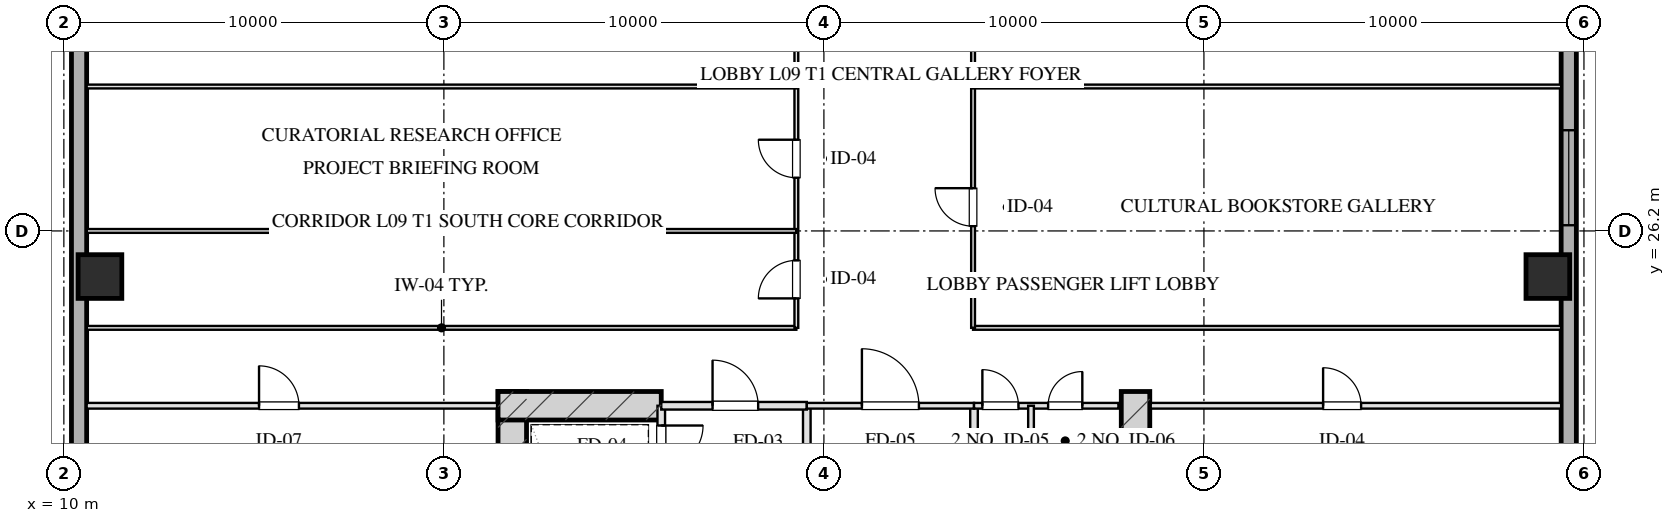
"""IFC4 building model, lengths in metres.
Left out: names, types, materials, properties, quantities, classifications, styles, units other than length and angle.
Written with IfcOpenShell. Run it as: python <this file> out.ifc"""

import sys

from ifc_helpers import new_model, si_unit, direction, frame, frame_2d, origin, origin_2d, place, context, subcontext, project, spatial, rectangle, hollow_rectangle, extrude, element, fill, save


model = new_model("IFC4")
c1 = context("Model", 3, precision=1e-05, world=origin(), true_north=direction((0.0, 1.0)))
c2 = subcontext(c1, "Body", "Model", "MODEL_VIEW")
j1 = project(units=[si_unit("LENGTHUNIT", "METRE"), si_unit("PLANEANGLEUNIT", "RADIAN")], contexts=[c1])
p1 = place(None, origin())
s1 = spatial("IfcSite", under=j1, at=p1, CompositionType="ELEMENT")
p2 = place(p1, origin())
s2 = spatial("IfcBuilding", under=s1, at=p2, CompositionType="ELEMENT")
p3 = place(p2, frame((0.0, 0.0, 42.0)))
s3 = spatial("IfcBuildingStorey", under=s2, at=p3, CompositionType="ELEMENT", Elevation=42.0)
for number, where, z_axis, x_axis in (
    (1, (21.8, 21.975, 0.0), (0.0, 0.0, 1.0), (0.0, -1.0, 0.0)),
    (2, (38.2, 21.975, 0.0), (0.0, 0.0, 1.0), (0.0, -1.0, 0.0)),
):
    element("IfcWall", number, at=place(p3, frame(where, z_axis=z_axis, x_axis=x_axis)), inside=s3, PredefinedType="SHEAR", context=c2, shape_type="SweptSolid", body=[
        extrude(rectangle(XDim=9.63, YDim=0.75, at=frame_2d((4.815, 0.0))), origin(), (0.0, 0.0, 1.0), 4.0),
    ])
p4 = place(p3, frame((21.425, 21.6, 0.0), z_axis=(0.0, 0.0, 1.0), x_axis=(1.0, 0.0, 0.0)))
e3 = element("IfcWall", 3, at=p4, inside=s3, PredefinedType="SHEAR", context=c2, shape_type="SweptSolid", body=[
    extrude(rectangle(XDim=4.295, YDim=0.75, at=frame_2d((2.147, 0.0))), origin(), (0.0, 0.0, 1.0), 4.0),
])
for number, where, z_axis, x_axis in (
    (4, (10.95, 25.0, 0.0), (0.0, 0.0, 1.0), (1.0, 0.0, 0.0)),
    (5, (49.05, 25.0, 0.0), (0.0, 0.0, 1.0), (1.0, 0.0, 0.0)),
):
    element("IfcColumn", number, at=place(p3, frame(where, z_axis=z_axis, x_axis=x_axis)), inside=s3, PredefinedType="COLUMN", context=c2, shape_type="SweptSolid", body=[
        extrude(hollow_rectangle(XDim=1.15, YDim=1.15, WallThickness=0.04, at=origin_2d()), origin(), (0.0, 0.0, 1.0), 4.001),
    ])
p5 = place(p3, frame((10.4, 7.2, 0.0), z_axis=(0.0, 0.0, 1.0), x_axis=(0.0, 1.0, 0.0)))
e6 = element("IfcWall", 6, at=p5, inside=s3, PredefinedType="SOLIDWALL", context=c2, shape_type="SweptSolid", body=[
    extrude(rectangle(XDim=53.6, YDim=0.4, at=frame_2d((26.8, 0.0))), origin(), (0.0, 0.0, 1.0), 3.1),
])
p6 = place(p5, frame((28.15, 0.0, 0.75)))
e7 = element("IfcOpeningElement", 7, at=p6, cuts=e6, PredefinedType="OPENING", context=c2, shape_type="SweptSolid", body=[
    extrude(rectangle(XDim=2.5, YDim=1.75, at=frame_2d((1.25, 0.875))), frame((0.0, 0.21, 0.0), z_axis=(0.0, -1.0, 0.0), x_axis=(1.0, 0.0, 0.0)), (0.0, 0.0, 1.0), 0.42),
])
p7 = place(p3, frame((49.6, 60.8, 0.0), z_axis=(0.0, 0.0, 1.0), x_axis=(0.0, -1.0, 0.0)))
e8 = element("IfcWall", 8, at=p7, inside=s3, PredefinedType="SOLIDWALL", context=c2, shape_type="SweptSolid", body=[
    extrude(rectangle(XDim=53.6, YDim=0.4, at=frame_2d((26.8, 0.0))), origin(), (0.0, 0.0, 1.0), 3.1),
])
p8 = place(p7, frame((31.95, 0.0, 0.75)))
e9 = element("IfcOpeningElement", 9, at=p8, cuts=e8, PredefinedType="OPENING", context=c2, shape_type="SweptSolid", body=[
    extrude(rectangle(XDim=2.5, YDim=1.75, at=frame_2d((1.25, 0.875))), frame((0.0, 0.21, 0.0), z_axis=(0.0, -1.0, 0.0), x_axis=(1.0, 0.0, 0.0)), (0.0, 0.0, 1.0), 0.42),
])
p9 = place(p7, frame((19.15, 0.0, 0.75)))
e10 = element("IfcOpeningElement", 10, at=p9, cuts=e8, PredefinedType="OPENING", context=c2, shape_type="SweptSolid", body=[
    extrude(rectangle(XDim=2.5, YDim=1.75, at=frame_2d((1.25, 0.875))), frame((0.0, 0.21, 0.0), z_axis=(0.0, -1.0, 0.0), x_axis=(1.0, 0.0, 0.0)), (0.0, 0.0, 1.0), 0.42),
])
p10 = place(p3, frame((25.72, 21.6, 0.0), z_axis=(0.0, 0.0, 1.0), x_axis=(0.0, -1.0, 0.0)))
e11 = element("IfcWall", 11, at=p10, inside=s3, PredefinedType="PARTITIONING", context=c2, shape_type="SweptSolid", body=[
    extrude(rectangle(XDim=1.9, YDim=0.2, at=frame_2d((0.95, 0.0))), origin(), (0.0, 0.0, 1.0), 3.705),
])
p11 = place(p10, frame((0.52, 0.0, 0.0)))
e12 = element("IfcOpeningElement", 12, at=p11, cuts=e11, PredefinedType="OPENING", context=c2, shape_type="SweptSolid", body=[
    extrude(rectangle(XDim=1.1, YDim=2.05, at=frame_2d((0.55, 1.025))), frame((0.0, 0.11, 0.0), z_axis=(0.0, -1.0, 0.0), x_axis=(1.0, 0.0, 0.0)), (0.0, 0.0, 1.0), 0.22),
])
p12 = place(p3, frame((29.55, 21.6, 0.0), z_axis=(0.0, 0.0, 1.0), x_axis=(0.0, -1.0, 0.0)))
e13 = element("IfcWall", 13, at=p12, inside=s3, PredefinedType="PARTITIONING", context=c2, shape_type="SweptSolid", body=[
    extrude(rectangle(XDim=8.43, YDim=0.2, at=frame_2d((4.215, 0.0))), origin(), (0.0, 0.0, 1.0), 3.705),
])
p13 = place(p3, frame((25.72, 21.6, 0.0), z_axis=(0.0, 0.0, 1.0), x_axis=(1.0, 0.0, 0.0)))
e14 = element("IfcWall", 14, at=p13, inside=s3, PredefinedType="PARTITIONING", context=c2, shape_type="SweptSolid", body=[
    extrude(rectangle(XDim=3.83, YDim=0.2, at=frame_2d((1.915, 0.0))), origin(), (0.0, 0.0, 1.0), 3.705),
])
p14 = place(p13, frame((1.35, 0.0, 0.0)))
e15 = element("IfcOpeningElement", 15, at=p14, cuts=e14, PredefinedType="OPENING", context=c2, shape_type="SweptSolid", body=[
    extrude(rectangle(XDim=1.2, YDim=2.05, at=frame_2d((0.6, 1.025))), frame((0.0, 0.11, 0.0), z_axis=(0.0, -1.0, 0.0), x_axis=(1.0, 0.0, 0.0)), (0.0, 0.0, 1.0), 0.22),
])
p15 = place(p3, frame((33.95, 21.6, 0.0), z_axis=(0.0, 0.0, 1.0), x_axis=(0.0, -1.0, 0.0)))
e16 = element("IfcWall", 16, at=p15, inside=s3, PredefinedType="PARTITIONING", context=c2, shape_type="SweptSolid", body=[
    extrude(rectangle(XDim=8.43, YDim=0.2, at=frame_2d((4.215, 0.0))), origin(), (0.0, 0.0, 1.0), 3.705),
])
p16 = place(p3, frame((29.55, 21.6, 0.0), z_axis=(0.0, 0.0, 1.0), x_axis=(1.0, 0.0, 0.0)))
e17 = element("IfcWall", 17, at=p16, inside=s3, PredefinedType="PARTITIONING", context=c2, shape_type="SweptSolid", body=[
    extrude(rectangle(XDim=4.4, YDim=0.15, at=frame_2d((2.2, 0.0))), origin(), (0.0, 0.0, 1.0), 3.705),
])
p17 = place(p16, frame((1.45, 0.0, 0.0)))
e18 = element("IfcOpeningElement", 18, at=p17, cuts=e17, PredefinedType="OPENING", context=c2, shape_type="SweptSolid", body=[
    extrude(rectangle(XDim=1.5, YDim=2.05, at=frame_2d((0.75, 1.025))), frame((0.0, 0.085, 0.0), z_axis=(0.0, -1.0, 0.0), x_axis=(1.0, 0.0, 0.0)), (0.0, 0.0, 1.0), 0.17),
])
p18 = place(p3, frame((33.95, 21.6, 0.0), z_axis=(0.0, 0.0, 1.0), x_axis=(1.0, 0.0, 0.0)))
e19 = element("IfcWall", 19, at=p18, inside=s3, PredefinedType="PARTITIONING", context=c2, shape_type="SweptSolid", body=[
    extrude(rectangle(XDim=3.8, YDim=0.15, at=frame_2d((1.9, 0.0))), origin(), (0.0, 0.0, 1.0), 3.705),
])
p19 = place(p18, frame((0.22, 0.0, 0.0)))
e20 = element("IfcOpeningElement", 20, at=p19, cuts=e19, PredefinedType="OPENING", context=c2, shape_type="SweptSolid", body=[
    extrude(rectangle(XDim=0.95, YDim=2.05, at=frame_2d((0.475, 1.025))), frame((0.0, 0.085, 0.0), z_axis=(0.0, -1.0, 0.0), x_axis=(1.0, 0.0, 0.0)), (0.0, 0.0, 1.0), 0.17),
])
p20 = place(p18, frame((1.95, 0.0, 0.0)))
e21 = element("IfcOpeningElement", 21, at=p20, cuts=e19, PredefinedType="OPENING", context=c2, shape_type="SweptSolid", body=[
    extrude(rectangle(XDim=0.9, YDim=2.05, at=frame_2d((0.45, 1.025))), frame((0.0, 0.085, 0.0), z_axis=(0.0, -1.0, 0.0), x_axis=(1.0, 0.0, 0.0)), (0.0, 0.0, 1.0), 0.17),
])
p21 = place(p3, frame((35.45, 21.6, 0.0), z_axis=(0.0, 0.0, 1.0), x_axis=(0.0, -1.0, 0.0)))
e22 = element("IfcWall", 22, at=p21, inside=s3, PredefinedType="PARTITIONING", context=c2, shape_type="SweptSolid", body=[
    extrude(rectangle(XDim=8.43, YDim=0.15, at=frame_2d((4.215, 0.0))), origin(), (0.0, 0.0, 1.0), 3.345),
])
p22 = place(p21, frame((2.55, 0.0, 0.0)))
e23 = element("IfcOpeningElement", 23, at=p22, cuts=e22, PredefinedType="OPENING", context=c2, shape_type="SweptSolid", body=[
    extrude(rectangle(XDim=0.95, YDim=2.05, at=frame_2d((0.475, 1.025))), frame((0.0, 0.085, 0.0), z_axis=(0.0, -1.0, 0.0), x_axis=(1.0, 0.0, 0.0)), (0.0, 0.0, 1.0), 0.17),
])
p23 = place(p21, frame((5.6, 0.0, 0.0)))
e24 = element("IfcOpeningElement", 24, at=p23, cuts=e22, PredefinedType="OPENING", context=c2, shape_type="SweptSolid", body=[
    extrude(rectangle(XDim=0.9, YDim=2.05, at=frame_2d((0.45, 1.025))), frame((0.0, 0.085, 0.0), z_axis=(0.0, -1.0, 0.0), x_axis=(1.0, 0.0, 0.0)), (0.0, 0.0, 1.0), 0.17),
])
p24 = place(p3, frame((10.6, 21.6, 0.0), z_axis=(0.0, 0.0, 1.0), x_axis=(1.0, 0.0, 0.0)))
e25 = element("IfcWall", 25, at=p24, inside=s3, PredefinedType="PARTITIONING", context=c2, shape_type="SweptSolid", body=[
    extrude(rectangle(XDim=10.8, YDim=0.15, at=frame_2d((5.4, 0.0))), origin(), (0.0, 0.0, 1.0), 3.705),
])
p25 = place(p24, frame((4.536, 0.0, 0.0)))
e26 = element("IfcOpeningElement", 26, at=p25, cuts=e25, PredefinedType="OPENING", context=c2, shape_type="SweptSolid", body=[
    extrude(rectangle(XDim=1.05, YDim=2.05, at=frame_2d((0.525, 1.025))), frame((0.0, 0.085, 0.0), z_axis=(0.0, -1.0, 0.0), x_axis=(1.0, 0.0, 0.0)), (0.0, 0.0, 1.0), 0.17),
])
p26 = place(p3, frame((38.6, 21.6, 0.0), z_axis=(0.0, 0.0, 1.0), x_axis=(1.0, 0.0, 0.0)))
e27 = element("IfcWall", 27, at=p26, inside=s3, PredefinedType="PARTITIONING", context=c2, shape_type="SweptSolid", body=[
    extrude(rectangle(XDim=10.8, YDim=0.15, at=frame_2d((5.4, 0.0))), origin(), (0.0, 0.0, 1.0), 3.705),
])
p27 = place(p26, frame((4.536, 0.0, 0.0)))
e28 = element("IfcOpeningElement", 28, at=p27, cuts=e27, PredefinedType="OPENING", context=c2, shape_type="SweptSolid", body=[
    extrude(rectangle(XDim=1.0, YDim=2.05, at=frame_2d((0.5, 1.025))), frame((0.0, 0.085, 0.0), z_axis=(0.0, -1.0, 0.0), x_axis=(1.0, 0.0, 0.0)), (0.0, 0.0, 1.0), 0.17),
])
p28 = place(p3, frame((10.6, 23.65, 0.0), z_axis=(0.0, 0.0, 1.0), x_axis=(1.0, 0.0, 0.0)))
e29 = element("IfcWall", 29, at=p28, inside=s3, PredefinedType="MOVABLE", context=c2, shape_type="SweptSolid", body=[
    extrude(rectangle(XDim=18.675, YDim=0.1, at=frame_2d((9.337, 0.0))), origin(), (0.0, 0.0, 1.0), 3.705),
])
p29 = place(p3, frame((33.925, 23.65, 0.0), z_axis=(0.0, 0.0, 1.0), x_axis=(1.0, 0.0, 0.0)))
e30 = element("IfcWall", 30, at=p29, inside=s3, PredefinedType="MOVABLE", context=c2, shape_type="SweptSolid", body=[
    extrude(rectangle(XDim=15.475, YDim=0.1, at=frame_2d((7.737, 0.0))), origin(), (0.0, 0.0, 1.0), 3.705),
])
p30 = place(p3, frame((29.275, 23.65, 0.0), z_axis=(0.0, 0.0, 1.0), x_axis=(0.0, 1.0, 0.0)))
e31 = element("IfcWall", 31, at=p30, inside=s3, PredefinedType="MOVABLE", context=c2, shape_type="SweptSolid", body=[
    extrude(rectangle(XDim=20.7, YDim=0.1, at=frame_2d((10.35, 0.0))), origin(), (0.0, 0.0, 1.0), 3.705),
])
p31 = place(p30, frame((0.775, 0.0, 0.0)))
e32 = element("IfcOpeningElement", 32, at=p31, cuts=e31, PredefinedType="OPENING", context=c2, shape_type="SweptSolid", body=[
    extrude(rectangle(XDim=1.0, YDim=2.05, at=frame_2d((0.5, 1.025))), frame((0.0, 0.06, 0.0), z_axis=(0.0, -1.0, 0.0), x_axis=(1.0, 0.0, 0.0)), (0.0, 0.0, 1.0), 0.12),
])
p32 = place(p30, frame((3.95, 0.0, 0.0)))
e33 = element("IfcOpeningElement", 33, at=p32, cuts=e31, PredefinedType="OPENING", context=c2, shape_type="SweptSolid", body=[
    extrude(rectangle(XDim=1.0, YDim=2.05, at=frame_2d((0.5, 1.025))), frame((0.0, 0.06, 0.0), z_axis=(0.0, -1.0, 0.0), x_axis=(1.0, 0.0, 0.0)), (0.0, 0.0, 1.0), 0.12),
])
p33 = place(p30, frame((8.364, 0.0, 0.0)))
e34 = element("IfcOpeningElement", 34, at=p33, cuts=e31, PredefinedType="OPENING", context=c2, shape_type="SweptSolid", body=[
    extrude(rectangle(XDim=1.0, YDim=2.05, at=frame_2d((0.5, 1.025))), frame((0.0, 0.06, 0.0), z_axis=(0.0, -1.0, 0.0), x_axis=(1.0, 0.0, 0.0)), (0.0, 0.0, 1.0), 0.12),
])
p34 = place(p30, frame((12.864, 0.0, 0.0)))
e35 = element("IfcOpeningElement", 35, at=p34, cuts=e31, PredefinedType="OPENING", context=c2, shape_type="SweptSolid", body=[
    extrude(rectangle(XDim=1.05, YDim=2.05, at=frame_2d((0.525, 1.025))), frame((0.0, 0.06, 0.0), z_axis=(0.0, -1.0, 0.0), x_axis=(1.0, 0.0, 0.0)), (0.0, 0.0, 1.0), 0.12),
])
p35 = place(p30, frame((16.383, 0.0, 0.0)))
e36 = element("IfcOpeningElement", 36, at=p35, cuts=e31, PredefinedType="OPENING", context=c2, shape_type="SweptSolid", body=[
    extrude(rectangle(XDim=0.85, YDim=2.05, at=frame_2d((0.425, 1.025))), frame((0.0, 0.06, 0.0), z_axis=(0.0, -1.0, 0.0), x_axis=(1.0, 0.0, 0.0)), (0.0, 0.0, 1.0), 0.12),
])
p36 = place(p30, frame((19.058, 0.0, 0.0)))
e37 = element("IfcOpeningElement", 37, at=p36, cuts=e31, PredefinedType="OPENING", context=c2, shape_type="SweptSolid", body=[
    extrude(rectangle(XDim=1.0, YDim=2.05, at=frame_2d((0.5, 1.025))), frame((0.0, 0.06, 0.0), z_axis=(0.0, -1.0, 0.0), x_axis=(1.0, 0.0, 0.0)), (0.0, 0.0, 1.0), 0.12),
])
p37 = place(p3, frame((33.925, 23.65, 0.0), z_axis=(0.0, 0.0, 1.0), x_axis=(0.0, 1.0, 0.0)))
e38 = element("IfcWall", 38, at=p37, inside=s3, PredefinedType="MOVABLE", context=c2, shape_type="SweptSolid", body=[
    extrude(rectangle(XDim=20.7, YDim=0.1, at=frame_2d((10.35, 0.0))), origin(), (0.0, 0.0, 1.0), 3.705),
])
p38 = place(p37, frame((2.675, 0.0, 0.0)))
e39 = element("IfcOpeningElement", 39, at=p38, cuts=e38, PredefinedType="OPENING", context=c2, shape_type="SweptSolid", body=[
    extrude(rectangle(XDim=1.0, YDim=2.05, at=frame_2d((0.5, 1.025))), frame((0.0, 0.06, 0.0), z_axis=(0.0, -1.0, 0.0), x_axis=(1.0, 0.0, 0.0)), (0.0, 0.0, 1.0), 0.12),
])
p39 = place(p37, frame((9.85, 0.0, 0.0)))
e40 = element("IfcOpeningElement", 40, at=p39, cuts=e38, PredefinedType="OPENING", context=c2, shape_type="SweptSolid", body=[
    extrude(rectangle(XDim=1.0, YDim=2.05, at=frame_2d((0.5, 1.025))), frame((0.0, 0.06, 0.0), z_axis=(0.0, -1.0, 0.0), x_axis=(1.0, 0.0, 0.0)), (0.0, 0.0, 1.0), 0.12),
])
p40 = place(p37, frame((17.025, 0.0, 0.0)))
e41 = element("IfcOpeningElement", 41, at=p40, cuts=e38, PredefinedType="OPENING", context=c2, shape_type="SweptSolid", body=[
    extrude(rectangle(XDim=1.0, YDim=2.05, at=frame_2d((0.5, 1.025))), frame((0.0, 0.06, 0.0), z_axis=(0.0, -1.0, 0.0), x_axis=(1.0, 0.0, 0.0)), (0.0, 0.0, 1.0), 0.12),
])
for number, where, z_axis, x_axis in (
    (42, (10.6, 26.2, 0.0), (0.0, 0.0, 1.0), (1.0, 0.0, 0.0)),
    (43, (10.6, 30.0, 0.0), (0.0, 0.0, 1.0), (1.0, 0.0, 0.0)),
):
    element("IfcWall", number, at=place(p3, frame(where, z_axis=z_axis, x_axis=x_axis)), inside=s3, PredefinedType="MOVABLE", context=c2, shape_type="SweptSolid", body=[
        extrude(rectangle(XDim=18.675, YDim=0.1, at=frame_2d((9.337, 0.0))), origin(), (0.0, 0.0, 1.0), 3.705),
    ])
p41 = place(p3, frame((33.925, 30.0, 0.0), z_axis=(0.0, 0.0, 1.0), x_axis=(1.0, 0.0, 0.0)))
e44 = element("IfcWall", 44, at=p41, inside=s3, PredefinedType="MOVABLE", context=c2, shape_type="SweptSolid", body=[
    extrude(rectangle(XDim=15.475, YDim=0.1, at=frame_2d((7.737, 0.0))), origin(), (0.0, 0.0, 1.0), 3.705),
])
p42 = place(p8, origin())
e45 = element("IfcWindow", 45, at=p42, inside=s3, PartitioningType="TRIPLE_PANEL_VERTICAL", PredefinedType="WINDOW", context=c2, shape_type="SweptSolid", body=[
    extrude(rectangle(XDim=2.5, YDim=1.75, at=frame_2d((1.25, 0.875))), frame((0.0, 0.03, 0.0), z_axis=(0.0, -1.0, 0.0), x_axis=(1.0, 0.0, 0.0)), (0.0, 0.0, 1.0), 0.06),
])
fill(e9, e45)
p43 = place(p11, origin())
e46 = element("IfcDoor", 46, at=p43, inside=s3, OperationType="SINGLE_SWING_LEFT", PredefinedType="DOOR", context=c2, shape_type="SweptSolid", body=[
    extrude(rectangle(XDim=1.1, YDim=2.05, at=frame_2d((0.55, 1.025))), frame((0.0, 0.025, 0.0), z_axis=(0.0, -1.0, 0.0), x_axis=(1.0, 0.0, 0.0)), (0.0, 0.0, 1.0), 0.05),
])
fill(e12, e46)
p44 = place(p14, origin())
e47 = element("IfcDoor", 47, at=p44, inside=s3, OperationType="SINGLE_SWING_LEFT", PredefinedType="DOOR", context=c2, shape_type="SweptSolid", body=[
    extrude(rectangle(XDim=1.2, YDim=2.05, at=frame_2d((0.6, 1.025))), frame((0.0, 0.025, 0.0), z_axis=(0.0, -1.0, 0.0), x_axis=(1.0, 0.0, 0.0)), (0.0, 0.0, 1.0), 0.05),
])
fill(e15, e47)
p45 = place(p17, origin())
e48 = element("IfcDoor", 48, at=p45, inside=s3, OperationType="SINGLE_SWING_LEFT", PredefinedType="DOOR", context=c2, shape_type="SweptSolid", body=[
    extrude(rectangle(XDim=1.5, YDim=2.05, at=frame_2d((0.75, 1.025))), frame((0.0, 0.025, 0.0), z_axis=(0.0, -1.0, 0.0), x_axis=(1.0, 0.0, 0.0)), (0.0, 0.0, 1.0), 0.05),
])
fill(e18, e48)
p46 = place(p19, origin())
e49 = element("IfcDoor", 49, at=p46, inside=s3, OperationType="SINGLE_SWING_LEFT", PredefinedType="DOOR", context=c2, shape_type="SweptSolid", body=[
    extrude(rectangle(XDim=0.95, YDim=2.05, at=frame_2d((0.475, 1.025))), frame((0.0, 0.025, 0.0), z_axis=(0.0, -1.0, 0.0), x_axis=(1.0, 0.0, 0.0)), (0.0, 0.0, 1.0), 0.05),
])
fill(e20, e49)
p47 = place(p20, origin())
e50 = element("IfcDoor", 50, at=p47, inside=s3, OperationType="SINGLE_SWING_RIGHT", PredefinedType="DOOR", context=c2, shape_type="SweptSolid", body=[
    extrude(rectangle(XDim=0.9, YDim=2.05, at=frame_2d((0.45, 1.025))), frame((0.0, 0.025, 0.0), z_axis=(0.0, -1.0, 0.0), x_axis=(1.0, 0.0, 0.0)), (0.0, 0.0, 1.0), 0.05),
])
fill(e21, e50)
p48 = place(p25, origin())
e51 = element("IfcDoor", 51, at=p48, inside=s3, OperationType="SINGLE_SWING_LEFT", PredefinedType="DOOR", context=c2, shape_type="SweptSolid", body=[
    extrude(rectangle(XDim=1.05, YDim=2.05, at=frame_2d((0.525, 1.025))), frame((0.0, 0.025, 0.0), z_axis=(0.0, -1.0, 0.0), x_axis=(1.0, 0.0, 0.0)), (0.0, 0.0, 1.0), 0.05),
])
fill(e26, e51)
p49 = place(p27, origin())
e52 = element("IfcDoor", 52, at=p49, inside=s3, OperationType="SINGLE_SWING_LEFT", PredefinedType="DOOR", context=c2, shape_type="SweptSolid", body=[
    extrude(rectangle(XDim=1.0, YDim=2.05, at=frame_2d((0.5, 1.025))), frame((0.0, 0.025, 0.0), z_axis=(0.0, -1.0, 0.0), x_axis=(1.0, 0.0, 0.0)), (0.0, 0.0, 1.0), 0.05),
])
fill(e28, e52)
p50 = place(p31, origin())
e53 = element("IfcDoor", 53, at=p50, inside=s3, OperationType="SINGLE_SWING_LEFT", PredefinedType="DOOR", context=c2, shape_type="SweptSolid", body=[
    extrude(rectangle(XDim=1.0, YDim=2.05, at=frame_2d((0.5, 1.025))), frame((0.0, 0.025, 0.0), z_axis=(0.0, -1.0, 0.0), x_axis=(1.0, 0.0, 0.0)), (0.0, 0.0, 1.0), 0.05),
])
fill(e32, e53)
p51 = place(p32, origin())
e54 = element("IfcDoor", 54, at=p51, inside=s3, OperationType="SINGLE_SWING_RIGHT", PredefinedType="DOOR", context=c2, shape_type="SweptSolid", body=[
    extrude(rectangle(XDim=1.0, YDim=2.05, at=frame_2d((0.5, 1.025))), frame((0.0, 0.025, 0.0), z_axis=(0.0, -1.0, 0.0), x_axis=(1.0, 0.0, 0.0)), (0.0, 0.0, 1.0), 0.05),
])
fill(e33, e54)
p52 = place(p38, origin())
e55 = element("IfcDoor", 55, at=p52, inside=s3, OperationType="SINGLE_SWING_RIGHT", PredefinedType="DOOR", context=c2, shape_type="SweptSolid", body=[
    extrude(rectangle(XDim=1.0, YDim=2.05, at=frame_2d((0.5, 1.025))), frame((0.0, 0.025, 0.0), z_axis=(0.0, -1.0, 0.0), x_axis=(1.0, 0.0, 0.0)), (0.0, 0.0, 1.0), 0.05),
])
fill(e39, e55)
save(model, sys.argv[1])
